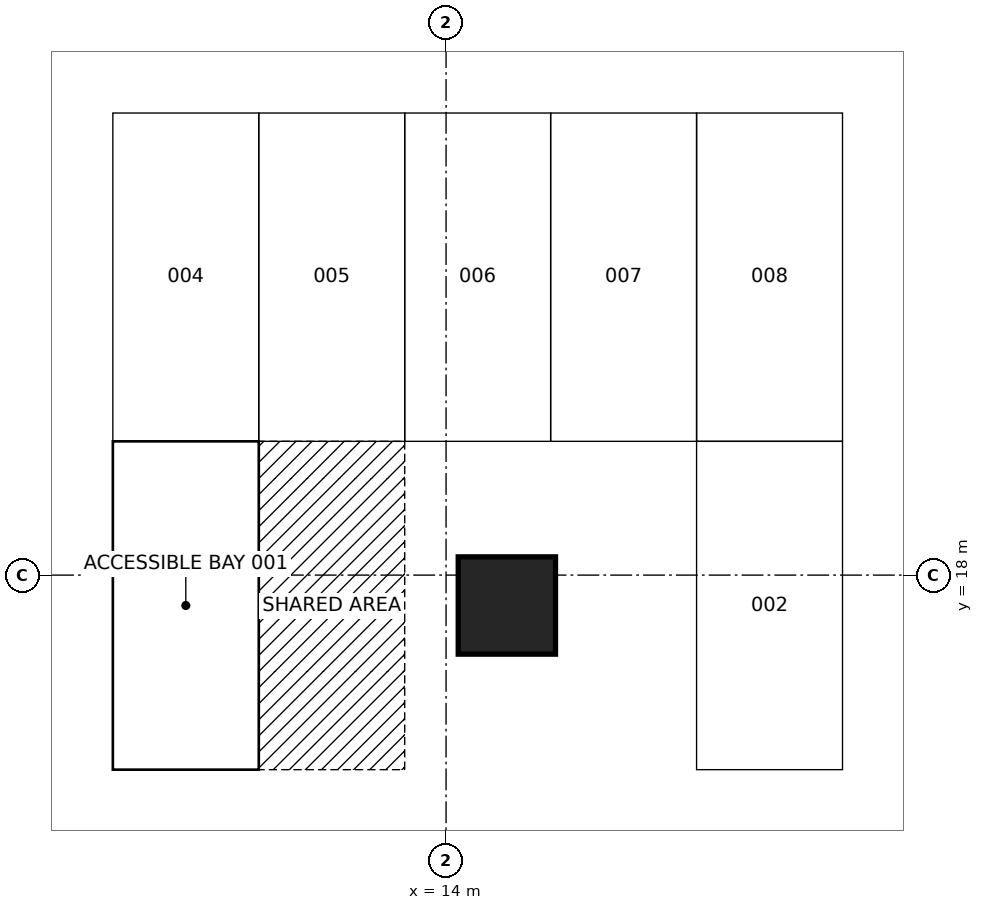
"""IFC4 building model, lengths in metres.
Left out: names, types, materials, properties, quantities, classifications, styles, units other than length and angle.
Written with IfcOpenShell. Run it as: python <this file> out.ifc"""

import sys

from ifc_helpers import new_model, si_unit, direction, frame, origin, origin_2d, place, context, subcontext, project, spatial, rectangle, extrude, element, save


model = new_model("IFC4")
c1 = context("Model", 3, precision=1e-05, world=origin(), true_north=direction((0.0, 1.0)))
c2 = subcontext(c1, "Body", "Model", "MODEL_VIEW")
j1 = project(units=[si_unit("LENGTHUNIT", "METRE"), si_unit("PLANEANGLEUNIT", "RADIAN")], contexts=[c1])
p1 = place(None, origin())
s1 = spatial("IfcSite", under=j1, at=p1, CompositionType="ELEMENT")
p2 = place(p1, origin())
s2 = spatial("IfcBuilding", under=s1, at=p2, CompositionType="ELEMENT")
p3 = place(p2, frame((0.0, 0.0, -3.7)))
s3 = spatial("IfcBuildingStorey", under=s2, at=p3, CompositionType="ELEMENT", Elevation=-3.7)
p4 = place(p3, frame((15.0, 17.5, 0.0), z_axis=(0.0, 0.0, 1.0), x_axis=(1.0, 0.0, 0.0)))
e1 = element("IfcColumn", 1, at=p4, inside=s3, PredefinedType="COLUMN", context=c2, shape_type="SweptSolid", body=[
    extrude(rectangle(XDim=1.6, YDim=1.6, at=origin_2d()), origin(), (0.0, 0.0, 1.0), 3.7),
])
save(model, sys.argv[1])
